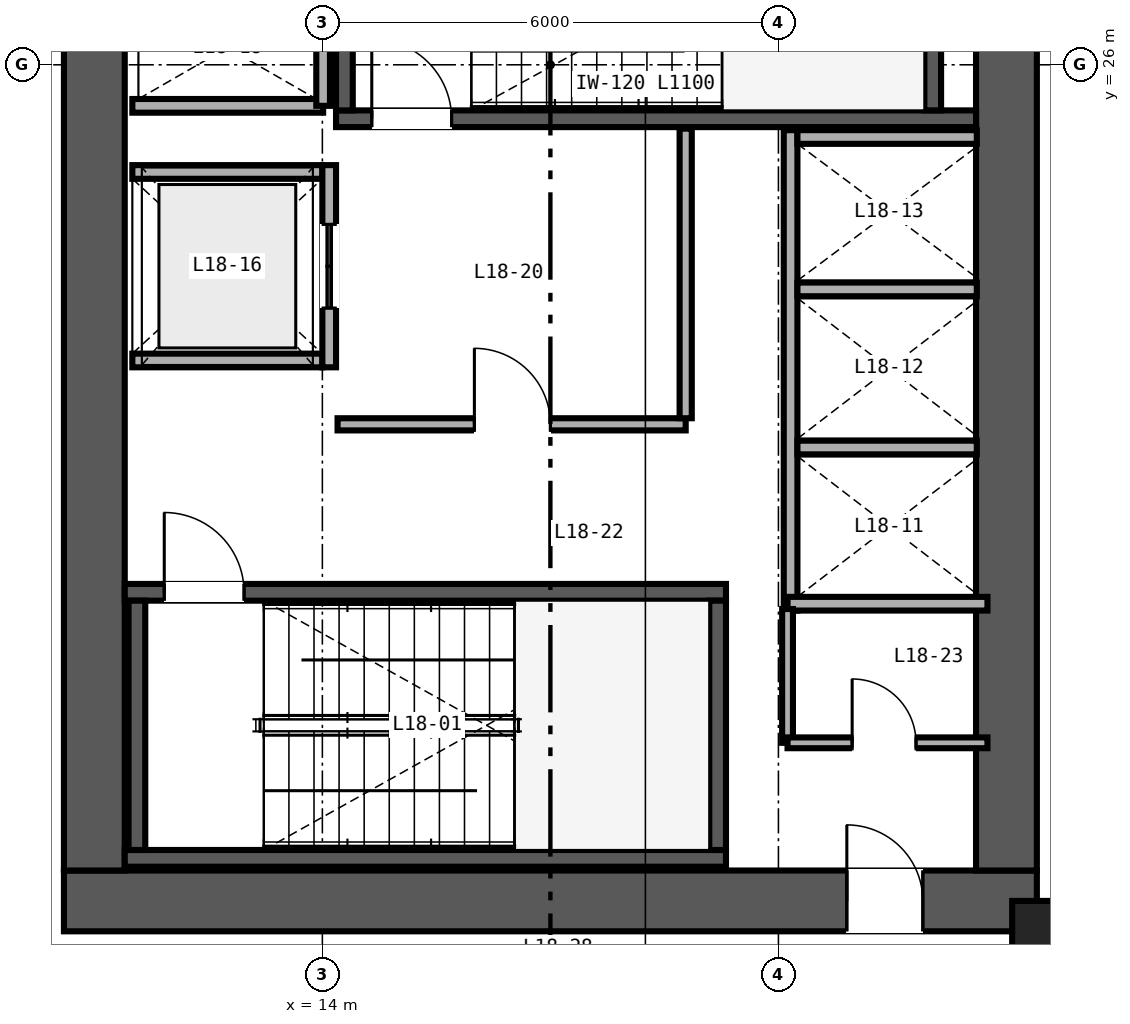
"""IFC4 building model, lengths in metres.
Left out: names, types, materials, properties, quantities, classifications, styles, units other than length and angle.
Written with IfcOpenShell. Run it as: python <this file> out.ifc"""

import sys

from ifc_helpers import new_model, si_unit, direction, frame, frame_2d, origin, origin_2d, place, context, subcontext, project, spatial, rectangle, hollow_rectangle, extrude, source, transform, mapped, element, fill, save


model = new_model("IFC4")
c1 = context("Model", 3, precision=1e-05, world=origin(), true_north=direction((0.0, 1.0)))
c2 = subcontext(c1, "Body", "Model", "MODEL_VIEW")
j1 = project(units=[si_unit("LENGTHUNIT", "METRE"), si_unit("PLANEANGLEUNIT", "RADIAN")], contexts=[c1])
p1 = place(None, origin())
s1 = spatial("IfcSite", under=j1, at=p1, CompositionType="ELEMENT")
p2 = place(p1, origin())
s2 = spatial("IfcBuilding", under=s1, at=p2, CompositionType="ELEMENT")
p3 = place(p2, frame((0.0, 0.0, 74.4)))
s3 = spatial("IfcBuildingStorey", under=s2, at=p3, CompositionType="ELEMENT", Elevation=74.4)
p4 = place(p3, frame((10.6, 15.0, 0.0), z_axis=(0.0, 0.0, 1.0), x_axis=(1.0, 0.0, 0.0)))
e1 = element("IfcWall", 1, at=p4, inside=s3, PredefinedType="SHEAR", context=c2, shape_type="SweptSolid", body=[
    extrude(rectangle(XDim=12.8, YDim=0.8, at=frame_2d((6.4, 0.0))), origin(), (0.0, 0.0, 1.0), 3.35),
])
p5 = place(p4, frame((10.3, 0.0, 0.0)))
e2 = element("IfcOpeningElement", 2, at=p5, cuts=e1, PredefinedType="OPENING", context=c2, shape_type="SweptSolid", body=[
    extrude(rectangle(XDim=1.0, YDim=2.15, at=frame_2d((0.5, 1.075))), frame((0.0, 0.41, 0.0), z_axis=(0.0, -1.0, 0.0), x_axis=(1.0, 0.0, 0.0)), (0.0, 0.0, 1.0), 0.82),
])
for number, where, z_axis, x_axis in (
    (3, (11.0, 15.4, 0.0), (0.0, 0.0, 1.0), (0.0, 1.0, 0.0)),
    (4, (23.0, 15.4, 0.0), (0.0, 0.0, 1.0), (0.0, 1.0, 0.0)),
):
    element("IfcWall", number, at=place(p3, frame(where, z_axis=z_axis, x_axis=x_axis)), inside=s3, PredefinedType="SHEAR", context=c2, shape_type="SweptSolid", body=[
        extrude(rectangle(XDim=21.2, YDim=0.8, at=frame_2d((10.6, 0.0))), origin(), (0.0, 0.0, 1.0), 3.35),
    ])
p6 = place(p3, frame((11.4, 15.56, 0.0), z_axis=(0.0, 0.0, 1.0), x_axis=(1.0, 0.0, 0.0)))
e5 = element("IfcWall", 5, at=p6, inside=s3, PredefinedType="SHEAR", context=c2, shape_type="SweptSolid", body=[
    extrude(rectangle(XDim=7.91, YDim=0.22, at=frame_2d((3.955, 0.0))), origin(), (0.0, 0.0, 1.0), 3.4),
])
p7 = place(p3, frame((11.4, 19.06, 0.0), z_axis=(0.0, 0.0, 1.0), x_axis=(1.0, 0.0, 0.0)))
e6 = element("IfcWall", 6, at=p7, inside=s3, PredefinedType="SHEAR", context=c2, shape_type="SweptSolid", body=[
    extrude(rectangle(XDim=7.91, YDim=0.22, at=frame_2d((3.955, 0.0))), origin(), (0.0, 0.0, 1.0), 3.4),
])
p8 = place(p7, frame((0.52, 0.0, 0.0)))
e7 = element("IfcOpeningElement", 7, at=p8, cuts=e6, PredefinedType="OPENING", context=c2, shape_type="SweptSolid", body=[
    extrude(rectangle(XDim=1.05, YDim=2.15, at=frame_2d((0.525, 1.075))), frame((0.0, 0.12, 0.0), z_axis=(0.0, -1.0, 0.0), x_axis=(1.0, 0.0, 0.0)), (0.0, 0.0, 1.0), 0.24),
])
for number, where, z_axis, x_axis in (
    (8, (11.56, 15.67, 0.0), (0.0, 0.0, 1.0), (0.0, 1.0, 0.0)),
    (9, (19.2, 15.67, 0.0), (0.0, 0.0, 1.0), (0.0, 1.0, 0.0)),
):
    element("IfcWall", number, at=place(p3, frame(where, z_axis=z_axis, x_axis=x_axis)), inside=s3, PredefinedType="SHEAR", context=c2, shape_type="SweptSolid", body=[
        extrude(rectangle(XDim=3.28, YDim=0.22, at=frame_2d((1.64, 0.0))), origin(), (0.0, 0.0, 1.0), 3.4),
    ])
p9 = place(p3, frame((14.18, 25.29, 0.0), z_axis=(0.0, 0.0, 1.0), x_axis=(1.0, 0.0, 0.0)))
e10 = element("IfcWall", 10, at=p9, inside=s3, PredefinedType="SHEAR", context=c2, shape_type="SweptSolid", body=[
    extrude(rectangle(XDim=8.42, YDim=0.22, at=frame_2d((4.21, 0.0))), origin(), (0.0, 0.0, 1.0), 3.4),
])
p10 = place(p9, frame((0.47, 0.0, 0.0)))
e11 = element("IfcOpeningElement", 11, at=p10, cuts=e10, PredefinedType="OPENING", context=c2, shape_type="SweptSolid", body=[
    extrude(rectangle(XDim=1.05, YDim=2.15, at=frame_2d((0.525, 1.075))), frame((0.0, 0.12, 0.0), z_axis=(0.0, -1.0, 0.0), x_axis=(1.0, 0.0, 0.0)), (0.0, 0.0, 1.0), 0.24),
])
for number, where, z_axis, x_axis in (
    (12, (14.29, 25.4, 0.0), (0.0, 0.0, 1.0), (0.0, 1.0, 0.0)),
    (13, (22.03, 25.4, 0.0), (0.0, 0.0, 1.0), (0.0, 1.0, 0.0)),
):
    element("IfcWall", number, at=place(p3, frame(where, z_axis=z_axis, x_axis=x_axis)), inside=s3, PredefinedType="SHEAR", context=c2, shape_type="SweptSolid", body=[
        extrude(rectangle(XDim=3.28, YDim=0.22, at=frame_2d((1.64, 0.0))), origin(), (0.0, 0.0, 1.0), 3.4),
    ])
m1 = source(origin(), c2, "Body", "SweptSolid", [
    extrude(hollow_rectangle(XDim=0.85, YDim=0.9, WallThickness=0.04, at=origin_2d()), origin(), (0.0, 0.0, 1.0), 3.35),
])
p11 = place(p3, frame((23.5, 14.55, 0.0), z_axis=(0.0, 0.0, 1.0), x_axis=(1.0, 0.0, 0.0)))
e14 = element("IfcColumn", 14, at=p11, inside=s3, PredefinedType="COLUMN", context=c2, shape_type="MappedRepresentation", body=[
    mapped(m1, transform((0.0, 0.0, 0.0), scale=1.0)),
])
p12 = place(p3, frame((20.16, 18.82, 0.0), z_axis=(0.0, 0.0, 1.0), x_axis=(0.0, 1.0, 0.0)))
e15 = element("IfcWall", 15, at=p12, inside=s3, PredefinedType="SOLIDWALL", context=c2, shape_type="SweptSolid", body=[
    extrude(rectangle(XDim=6.32, YDim=0.18, at=frame_2d((3.16, 0.0))), origin(), (0.0, 0.0, 1.0), 2.36),
])
p13 = place(p3, frame((20.12, 18.91, 0.0), z_axis=(0.0, 0.0, 1.0), x_axis=(1.0, 0.0, 0.0)))
e16 = element("IfcWall", 16, at=p13, inside=s3, PredefinedType="SOLIDWALL", context=c2, shape_type="SweptSolid", body=[
    extrude(rectangle(XDim=2.63, YDim=0.18, at=frame_2d((1.315, 0.0))), origin(), (0.0, 0.0, 1.0), 3.35),
])
p14 = place(p3, frame((20.25, 25.05, 0.0), z_axis=(0.0, 0.0, 1.0), x_axis=(1.0, 0.0, 0.0)))
e17 = element("IfcWall", 17, at=p14, inside=s3, PredefinedType="SOLIDWALL", context=c2, shape_type="SweptSolid", body=[
    extrude(rectangle(XDim=2.36, YDim=0.18, at=frame_2d((1.18, 0.0))), origin(), (0.0, 0.0, 1.0), 3.35),
])
p15 = place(p3, frame((20.25, 20.965, 0.0), z_axis=(0.0, 0.0, 1.0), x_axis=(1.0, 0.0, 0.0)))
e18 = element("IfcWall", 18, at=p15, inside=s3, PredefinedType="SOLIDWALL", context=c2, shape_type="SweptSolid", body=[
    extrude(rectangle(XDim=2.36, YDim=0.18, at=frame_2d((1.18, 0.0))), origin(), (0.0, 0.0, 1.0), 2.36),
])
p16 = place(p3, frame((20.25, 23.045, 0.0), z_axis=(0.0, 0.0, 1.0), x_axis=(1.0, 0.0, 0.0)))
e19 = element("IfcWall", 19, at=p16, inside=s3, PredefinedType="SOLIDWALL", context=c2, shape_type="SweptSolid", body=[
    extrude(rectangle(XDim=2.36, YDim=0.18, at=frame_2d((1.18, 0.0))), origin(), (0.0, 0.0, 1.0), 3.35),
])
for number, where, z_axis, x_axis in (
    (20, (11.5, 22.11, 0.0), (0.0, 0.0, 1.0), (1.0, 0.0, 0.0)),
    (21, (11.5, 24.59, 0.0), (0.0, 0.0, 1.0), (1.0, 0.0, 0.0)),
):
    element("IfcWall", number, at=place(p3, frame(where, z_axis=z_axis, x_axis=x_axis)), inside=s3, PredefinedType="SOLIDWALL", context=c2, shape_type="SweptSolid", body=[
        extrude(rectangle(XDim=2.5, YDim=0.18, at=frame_2d((1.25, 0.0))), origin(), (0.0, 0.0, 1.0), 3.35),
    ])
p17 = place(p3, frame((14.09, 22.02, 0.0), z_axis=(0.0, 0.0, 1.0), x_axis=(0.0, 1.0, 0.0)))
e22 = element("IfcWall", 22, at=p17, inside=s3, PredefinedType="SOLIDWALL", context=c2, shape_type="SweptSolid", body=[
    extrude(rectangle(XDim=2.66, YDim=0.18, at=frame_2d((1.33, 0.0))), origin(), (0.0, 0.0, 1.0), 3.35),
])
p18 = place(p17, frame((0.78, 0.0, 0.0)))
e23 = element("IfcOpeningElement", 23, at=p18, cuts=e22, PredefinedType="OPENING", context=c2, shape_type="SweptSolid", body=[
    extrude(rectangle(XDim=1.1, YDim=2.2, at=frame_2d((0.55, 1.1))), frame((0.0, 0.1, 0.0), z_axis=(0.0, -1.0, 0.0), x_axis=(1.0, 0.0, 0.0)), (0.0, 0.0, 1.0), 0.2),
])
p19 = place(p3, frame((11.5, 25.46, 0.0), z_axis=(0.0, 0.0, 1.0), x_axis=(1.0, 0.0, 0.0)))
e24 = element("IfcWall", 24, at=p19, inside=s3, PredefinedType="SOLIDWALL", context=c2, shape_type="SweptSolid", body=[
    extrude(rectangle(XDim=2.51, YDim=0.18, at=frame_2d((1.255, 0.0))), origin(), (0.0, 0.0, 1.0), 3.35),
])
p20 = place(p3, frame((14.01, 25.46, 0.0), z_axis=(0.0, 0.0, 1.0), x_axis=(0.0, 1.0, 0.0)))
e25 = element("IfcWall", 25, at=p20, inside=s3, PredefinedType="SOLIDWALL", context=c2, shape_type="SweptSolid", body=[
    extrude(rectangle(XDim=3.08, YDim=0.18, at=frame_2d((1.54, 0.0))), origin(), (0.0, 0.0, 1.0), 3.35),
])
p21 = place(p3, frame((14.2, 21.27, 0.0), z_axis=(0.0, 0.0, 1.0), x_axis=(1.0, 0.0, 0.0)))
e26 = element("IfcWall", 26, at=p21, inside=s3, PredefinedType="PARTITIONING", context=c2, shape_type="SweptSolid", body=[
    extrude(rectangle(XDim=4.58, YDim=0.16, at=frame_2d((2.29, 0.0))), origin(), (0.0, 0.0, 1.0), 3.35),
])
p22 = place(p21, frame((1.8, 0.0, 0.0)))
e27 = element("IfcOpeningElement", 27, at=p22, cuts=e26, PredefinedType="OPENING", context=c2, shape_type="SweptSolid", body=[
    extrude(rectangle(XDim=1.0, YDim=2.15, at=frame_2d((0.5, 1.075))), frame((0.0, 0.09, 0.0), z_axis=(0.0, -1.0, 0.0), x_axis=(1.0, 0.0, 0.0)), (0.0, 0.0, 1.0), 0.18),
])
p23 = place(p3, frame((18.78, 21.35, 0.0), z_axis=(0.0, 0.0, 1.0), x_axis=(0.0, 1.0, 0.0)))
e28 = element("IfcWall", 28, at=p23, inside=s3, PredefinedType="PARTITIONING", context=c2, shape_type="SweptSolid", body=[
    extrude(rectangle(XDim=3.81, YDim=0.16, at=frame_2d((1.905, 0.0))), origin(), (0.0, 0.0, 1.0), 3.35),
])
p24 = place(p3, frame((20.12, 17.08, 0.0), z_axis=(0.0, 0.0, 1.0), x_axis=(0.0, 1.0, 0.0)))
e29 = element("IfcWall", 29, at=p24, inside=s3, PredefinedType="PARTITIONING", context=c2, shape_type="SweptSolid", body=[
    extrude(rectangle(XDim=1.76, YDim=0.142, at=frame_2d((0.88, 0.0))), origin(), (0.0, 0.0, 1.0), 3.35),
])
p25 = place(p3, frame((20.12, 17.08, 0.0), z_axis=(0.0, 0.0, 1.0), x_axis=(1.0, 0.0, 0.0)))
e30 = element("IfcWall", 30, at=p25, inside=s3, PredefinedType="PARTITIONING", context=c2, shape_type="SweptSolid", body=[
    extrude(rectangle(XDim=2.63, YDim=0.142, at=frame_2d((1.315, 0.0))), origin(), (0.0, 0.0, 1.0), 3.35),
])
p26 = place(p25, frame((0.85, 0.0, 0.0)))
e31 = element("IfcOpeningElement", 31, at=p26, cuts=e30, PredefinedType="OPENING", context=c2, shape_type="SweptSolid", body=[
    extrude(rectangle(XDim=0.84, YDim=2.1, at=frame_2d((0.42, 1.05))), frame((0.0, 0.081, 0.0), z_axis=(0.0, -1.0, 0.0), x_axis=(1.0, 0.0, 0.0)), (0.0, 0.0, 1.0), 0.162),
])
m2 = source(origin(), c2, "Body", "SweptSolid", [
    extrude(rectangle(XDim=1.05, YDim=2.15, at=frame_2d((0.525, 1.075))), frame((0.0, 0.025, 0.0), z_axis=(0.0, -1.0, 0.0), x_axis=(1.0, 0.0, 0.0)), (0.0, 0.0, 1.0), 0.05),
])
p27 = place(p8, origin())
e32 = element("IfcDoor", 32, at=p27, inside=s3, OperationType="SINGLE_SWING_LEFT", PredefinedType="DOOR", context=c2, shape_type="MappedRepresentation", body=[
    mapped(m2, transform((0.0, 0.0, 0.0), scale=1.0)),
])
fill(e7, e32)
p28 = place(p10, origin())
e33 = element("IfcDoor", 33, at=p28, inside=s3, OperationType="SINGLE_SWING_LEFT", PredefinedType="DOOR", context=c2, shape_type="MappedRepresentation", body=[
    mapped(m2, transform((0.0, 0.0, 0.0), scale=1.0)),
])
fill(e11, e33)
m3 = source(origin(), c2, "Body", "SweptSolid", [
    extrude(rectangle(XDim=1.1, YDim=2.2, at=frame_2d((0.55, 1.1))), frame((0.0, 0.025, 0.0), z_axis=(0.0, -1.0, 0.0), x_axis=(1.0, 0.0, 0.0)), (0.0, 0.0, 1.0), 0.05),
])
p29 = place(p18, origin())
e34 = element("IfcDoor", 34, at=p29, inside=s3, OperationType="DOUBLE_DOOR_SLIDING", PredefinedType="DOOR", context=c2, shape_type="MappedRepresentation", body=[
    mapped(m3, transform((0.0, 0.0, 0.0), scale=1.0)),
])
fill(e23, e34)
m4 = source(origin(), c2, "Body", "SweptSolid", [
    extrude(rectangle(XDim=1.0, YDim=2.15, at=frame_2d((0.5, 1.075))), frame((0.0, 0.025, 0.0), z_axis=(0.0, -1.0, 0.0), x_axis=(1.0, 0.0, 0.0)), (0.0, 0.0, 1.0), 0.05),
])
p30 = place(p22, origin())
e35 = element("IfcDoor", 35, at=p30, inside=s3, OperationType="SINGLE_SWING_LEFT", PredefinedType="DOOR", context=c2, shape_type="MappedRepresentation", body=[
    mapped(m4, transform((0.0, 0.0, 0.0), scale=1.0)),
])
fill(e27, e35)
m5 = source(origin(), c2, "Body", "SweptSolid", [
    extrude(rectangle(XDim=0.84, YDim=2.1, at=frame_2d((0.42, 1.05))), frame((0.0, 0.025, 0.0), z_axis=(0.0, -1.0, 0.0), x_axis=(1.0, 0.0, 0.0)), (0.0, 0.0, 1.0), 0.05),
])
p31 = place(p26, origin())
e36 = element("IfcDoor", 36, at=p31, inside=s3, OperationType="SINGLE_SWING_LEFT", PredefinedType="DOOR", context=c2, shape_type="MappedRepresentation", body=[
    mapped(m5, transform((0.0, 0.0, 0.0), scale=1.0)),
])
fill(e31, e36)
p32 = place(p5, origin())
e37 = element("IfcDoor", 37, at=p32, inside=s3, OperationType="SINGLE_SWING_LEFT", PredefinedType="DOOR", context=c2, shape_type="MappedRepresentation", body=[
    mapped(m4, transform((0.0, 0.0, 0.0), scale=1.0)),
])
fill(e2, e37)
save(model, sys.argv[1])
